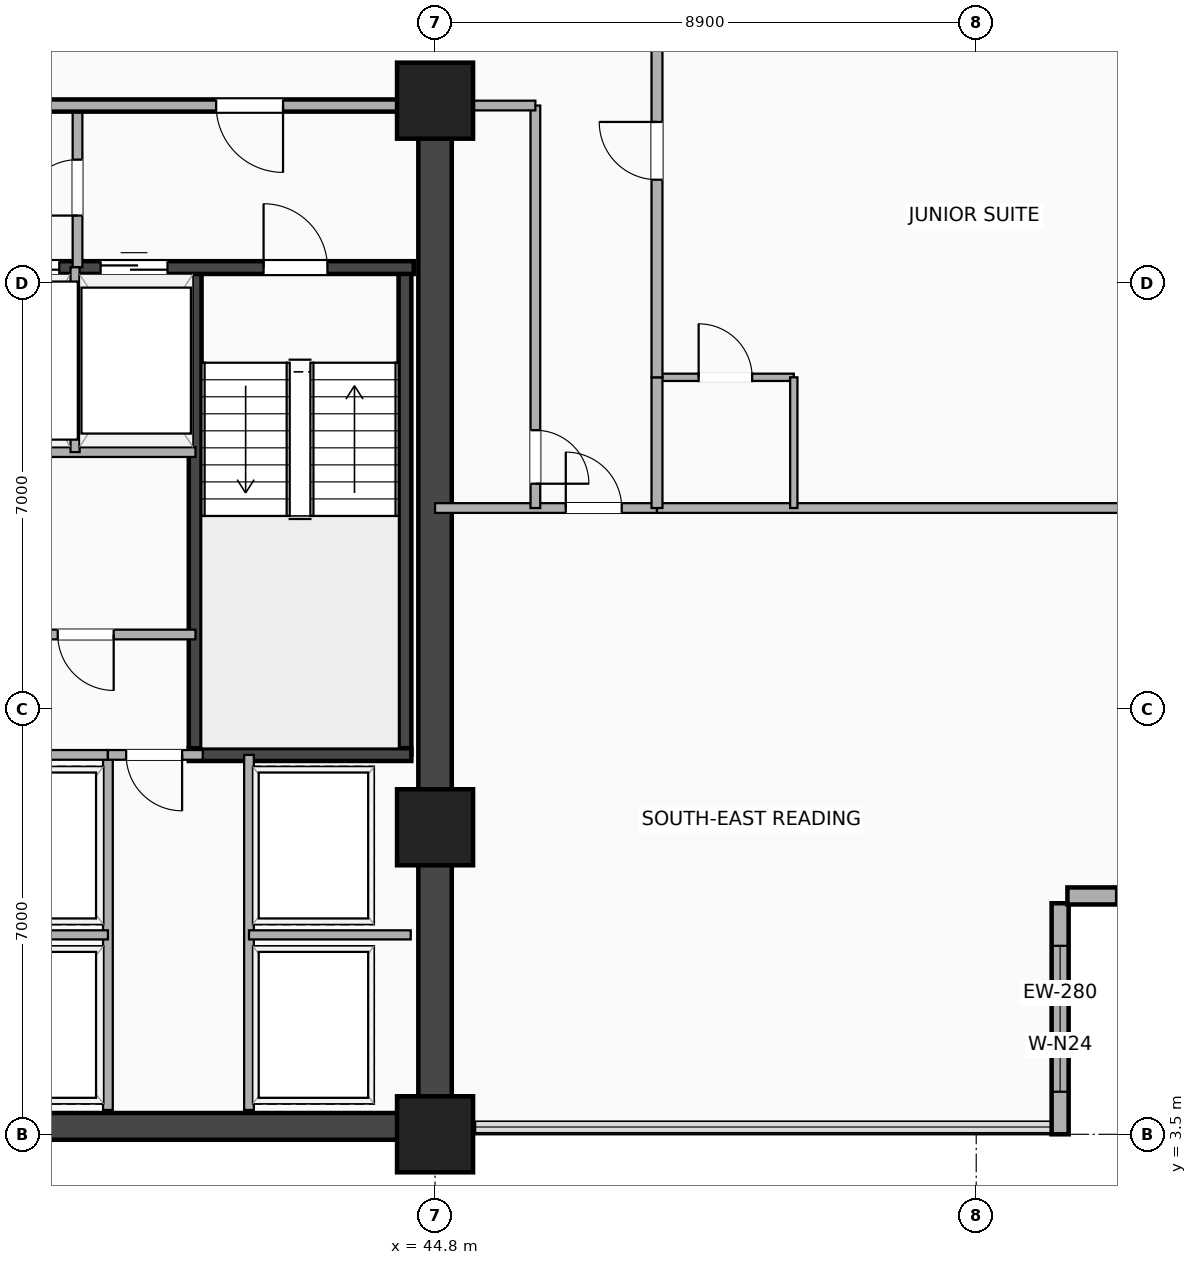
"""IFC4 building model, lengths in metres.
Left out: names, types, materials, properties, quantities, classifications, styles, units other than length and angle.
Written with IfcOpenShell. Run it as: python <this file> out.ifc"""

import sys

from ifc_helpers import new_model, si_unit, direction, frame, frame_2d, origin, origin_2d, place, context, subcontext, project, spatial, rectangle, extrude, element, fill, save


model = new_model("IFC4")
c1 = context("Model", 3, precision=1e-05, world=origin(), true_north=direction((0.0, 1.0)))
c2 = subcontext(c1, "Body", "Model", "MODEL_VIEW")
j1 = project(units=[si_unit("LENGTHUNIT", "METRE"), si_unit("PLANEANGLEUNIT", "RADIAN")], contexts=[c1])
p1 = place(None, origin())
s1 = spatial("IfcSite", under=j1, at=p1, CompositionType="ELEMENT")
p2 = place(p1, origin())
s2 = spatial("IfcBuilding", under=s1, at=p2, CompositionType="ELEMENT")
p3 = place(p2, frame((0.0, 0.0, 95.2)))
s3 = spatial("IfcBuildingStorey", under=s2, at=p3, CompositionType="ELEMENT", Elevation=95.2)
p4 = place(p3, frame((20.3, 3.63, 0.0), z_axis=(0.0, 0.0, 1.0), x_axis=(1.0, 0.0, 0.0)))
e1 = element("IfcWall", 1, at=p4, inside=s3, PredefinedType="SHEAR", context=c2, shape_type="SweptSolid", body=[
    extrude(rectangle(XDim=24.5, YDim=0.44, at=frame_2d((12.25, 0.0))), origin(), (0.0, 0.0, 1.0), 3.24),
])
p5 = place(p3, frame((44.8, 3.5, 0.0), z_axis=(0.0, 0.0, 1.0), x_axis=(0.0, 1.0, 0.0)))
e2 = element("IfcWall", 2, at=p5, inside=s3, PredefinedType="SHEAR", context=c2, shape_type="SweptSolid", body=[
    extrude(rectangle(XDim=16.9, YDim=0.55, at=frame_2d((8.45, 0.0))), origin(), (0.0, 0.0, 1.0), 3.24),
])
for number, where, z_axis, x_axis in (
    (3, (40.855, 9.745, 0.0), (0.0, 0.0, 1.0), (0.0, 1.0, 0.0)),
    (4, (44.305, 9.745, 0.0), (0.0, 0.0, 1.0), (0.0, 1.0, 0.0)),
):
    element("IfcWall", number, at=place(p3, frame(where, z_axis=z_axis, x_axis=x_axis)), inside=s3, PredefinedType="SHEAR", context=c2, shape_type="SweptSolid", body=[
        extrude(rectangle(XDim=8.01, YDim=0.21, at=frame_2d((4.005, 0.0))), origin(), (0.0, 0.0, 1.0), 3.24),
    ])
p6 = place(p3, frame((40.75, 9.745, 0.0), z_axis=(0.0, 0.0, 1.0), x_axis=(1.0, 0.0, 0.0)))
e5 = element("IfcWall", 5, at=p6, inside=s3, PredefinedType="SHEAR", context=c2, shape_type="SweptSolid", body=[
    extrude(rectangle(XDim=3.66, YDim=0.21, at=frame_2d((1.83, 0.0))), origin(), (0.0, 0.0, 1.0), 3.24),
])
p7 = place(p3, frame((37.25, 17.755, 0.0), z_axis=(0.0, 0.0, 1.0), x_axis=(1.0, 0.0, 0.0)))
e6 = element("IfcWall", 6, at=p7, inside=s3, PredefinedType="SHEAR", context=c2, shape_type="SweptSolid", body=[
    extrude(rectangle(XDim=7.2, YDim=0.21, at=frame_2d((3.6, 0.0))), origin(), (0.0, 0.0, 1.0), 3.24),
])
p8 = place(p7, frame((0.25, 0.0, 0.0)))
e7 = element("IfcOpeningElement", 7, at=p8, cuts=e6, PredefinedType="OPENING", context=c2, shape_type="SweptSolid", body=[
    extrude(rectangle(XDim=1.12, YDim=2.2, at=frame_2d((0.56, 1.1))), frame((0.0, 0.115, 0.0), z_axis=(0.0, -1.0, 0.0), x_axis=(1.0, 0.0, 0.0)), (0.0, 0.0, 1.0), 0.23),
])
p9 = place(p7, frame((2.05, 0.0, 0.0)))
e8 = element("IfcOpeningElement", 8, at=p9, cuts=e6, PredefinedType="OPENING", context=c2, shape_type="SweptSolid", body=[
    extrude(rectangle(XDim=1.1, YDim=2.18, at=frame_2d((0.55, 1.09))), frame((0.0, 0.115, 0.0), z_axis=(0.0, -1.0, 0.0), x_axis=(1.0, 0.0, 0.0)), (0.0, 0.0, 1.0), 0.23),
])
p10 = place(p7, frame((5.78, 0.0, 0.0), z_axis=(0.0, 0.0, 1.0), x_axis=(-1.0, 0.0, 0.0)))
e9 = element("IfcOpeningElement", 9, at=p10, cuts=e6, PredefinedType="OPENING", context=c2, shape_type="SweptSolid", body=[
    extrude(rectangle(XDim=1.05, YDim=2.15, at=frame_2d((0.525, 1.075))), frame((0.0, 0.115, 0.0), z_axis=(0.0, -1.0, 0.0), x_axis=(1.0, 0.0, 0.0)), (0.0, 0.0, 1.0), 0.23),
])
for number, where, z_axis, x_axis in (
    (10, (44.8, 3.5, -0.26), (0.0, 0.0, 1.0), (1.0, 0.0, 0.0)),
    (11, (44.8, 8.55, -0.26), (0.0, 0.0, 1.0), (1.0, 0.0, 0.0)),
    (12, (44.8, 20.5, -0.26), (0.0, 0.0, 1.0), (1.0, 0.0, 0.0)),
):
    element("IfcColumn", number, at=place(p3, frame(where, z_axis=z_axis, x_axis=x_axis)), inside=s3, PredefinedType="COLUMN", context=c2, shape_type="SweptSolid", body=[
        extrude(rectangle(XDim=1.25, YDim=1.25, at=origin_2d()), origin(), (0.0, 0.0, 1.0), 3.5),
    ])
p11 = place(p3, frame((55.08, 3.5, 0.0), z_axis=(0.0, 0.0, 1.0), x_axis=(0.0, 1.0, 0.0)))
e13 = element("IfcWall", 13, at=p11, inside=s3, PredefinedType="SOLIDWALL", context=c2, shape_type="SweptSolid", body=[
    extrude(rectangle(XDim=3.8, YDim=0.28, at=frame_2d((1.9, 0.0))), origin(), (0.0, 0.0, 1.0), 3.24),
])
p12 = place(p11, frame((0.7, 0.0, 0.85)))
e14 = element("IfcOpeningElement", 14, at=p12, cuts=e13, PredefinedType="OPENING", context=c2, shape_type="SweptSolid", body=[
    extrude(rectangle(XDim=2.4, YDim=1.65, at=frame_2d((1.2, 0.825))), frame((0.0, 0.15, 0.0), z_axis=(0.0, -1.0, 0.0), x_axis=(1.0, 0.0, 0.0)), (0.0, 0.0, 1.0), 0.3),
])
p13 = place(p3, frame((55.2, 7.42, 0.0), z_axis=(0.0, 0.0, 1.0), x_axis=(1.0, 0.0, 0.0)))
e15 = element("IfcWall", 15, at=p13, inside=s3, PredefinedType="SOLIDWALL", context=c2, shape_type="SweptSolid", body=[
    extrude(rectangle(XDim=3.8, YDim=0.28, at=frame_2d((1.9, 0.0))), origin(), (0.0, 0.0, 1.0), 3.24),
])
p14 = place(p13, frame((0.8, 0.0, 0.85)))
e16 = element("IfcOpeningElement", 16, at=p14, cuts=e15, PredefinedType="OPENING", context=c2, shape_type="SweptSolid", body=[
    extrude(rectangle(XDim=2.2, YDim=1.65, at=frame_2d((1.1, 0.825))), frame((0.0, 0.15, 0.0), z_axis=(0.0, -1.0, 0.0), x_axis=(1.0, 0.0, 0.0)), (0.0, 0.0, 1.0), 0.3),
])
p15 = place(p3, frame((38.92, 17.76, 0.0), z_axis=(0.0, 0.0, 1.0), x_axis=(0.0, 1.0, 0.0)))
e17 = element("IfcWall", 17, at=p15, inside=s3, PredefinedType="PARTITIONING", context=c2, shape_type="SweptSolid", body=[
    extrude(rectangle(XDim=2.66, YDim=0.16, at=frame_2d((1.33, 0.0))), origin(), (0.0, 0.0, 1.0), 2.614),
])
p16 = place(p15, frame((1.77, 0.0, 0.0), z_axis=(0.0, 0.0, 1.0), x_axis=(-1.0, 0.0, 0.0)))
e18 = element("IfcOpeningElement", 18, at=p16, cuts=e17, PredefinedType="OPENING", context=c2, shape_type="SweptSolid", body=[
    extrude(rectangle(XDim=0.92, YDim=2.08, at=frame_2d((0.46, 1.04))), frame((0.0, 0.09, 0.0), z_axis=(0.0, -1.0, 0.0), x_axis=(1.0, 0.0, 0.0)), (0.0, 0.0, 1.0), 0.18),
])
p17 = place(p3, frame((37.25, 14.72, 0.0), z_axis=(0.0, 0.0, 1.0), x_axis=(1.0, 0.0, 0.0)))
e19 = element("IfcWall", 19, at=p17, inside=s3, PredefinedType="PARTITIONING", context=c2, shape_type="SweptSolid", body=[
    extrude(rectangle(XDim=3.61, YDim=0.16, at=frame_2d((1.805, 0.0))), origin(), (0.0, 0.0, 1.0), 3.24),
])
p18 = place(p3, frame((38.88, 14.72, 0.0), z_axis=(0.0, 0.0, 1.0), x_axis=(0.0, 1.0, 0.0)))
e20 = element("IfcWall", 20, at=p18, inside=s3, PredefinedType="PARTITIONING", context=c2, shape_type="SweptSolid", body=[
    extrude(rectangle(XDim=3.04, YDim=0.15, at=frame_2d((1.52, 0.0))), origin(), (0.0, 0.0, 1.0), 3.24),
])
p19 = place(p3, frame((37.0, 20.42, 0.0), z_axis=(0.0, 0.0, 1.0), x_axis=(1.0, 0.0, 0.0)))
e21 = element("IfcWall", 21, at=p19, inside=s3, PredefinedType="PARTITIONING", context=c2, shape_type="SweptSolid", body=[
    extrude(rectangle(XDim=7.45, YDim=0.2, at=frame_2d((3.725, 0.0))), origin(), (0.0, 0.0, 1.0), 2.313),
])
p20 = place(p19, frame((4.2, 0.0, 0.0)))
e22 = element("IfcOpeningElement", 22, at=p20, cuts=e21, PredefinedType="OPENING", context=c2, shape_type="SweptSolid", body=[
    extrude(rectangle(XDim=1.1, YDim=2.15, at=frame_2d((0.55, 1.075))), frame((0.0, 0.11, 0.0), z_axis=(0.0, -1.0, 0.0), x_axis=(1.0, 0.0, 0.0)), (0.0, 0.0, 1.0), 0.22),
])
p21 = place(p3, frame((37.25, 11.72, 0.0), z_axis=(0.0, 0.0, 1.0), x_axis=(1.0, 0.0, 0.0)))
e23 = element("IfcWall", 23, at=p21, inside=s3, PredefinedType="PARTITIONING", context=c2, shape_type="SweptSolid", body=[
    extrude(rectangle(XDim=3.61, YDim=0.16, at=frame_2d((1.805, 0.0))), origin(), (0.0, 0.0, 1.0), 3.24),
])
p22 = place(p21, frame((1.345, 0.0, 0.0)))
e24 = element("IfcOpeningElement", 24, at=p22, cuts=e23, PredefinedType="OPENING", context=c2, shape_type="SweptSolid", body=[
    extrude(rectangle(XDim=0.92, YDim=2.08, at=frame_2d((0.46, 1.04))), frame((0.0, 0.09, 0.0), z_axis=(0.0, -1.0, 0.0), x_axis=(1.0, 0.0, 0.0)), (0.0, 0.0, 1.0), 0.18),
])
for number, where, z_axis, x_axis in (
    (25, (39.42, 3.9, 0.0), (0.0, 0.0, 1.0), (0.0, 1.0, 0.0)),
    (26, (41.74, 3.9, 0.0), (0.0, 0.0, 1.0), (0.0, 1.0, 0.0)),
):
    element("IfcWall", number, at=place(p3, frame(where, z_axis=z_axis, x_axis=x_axis)), inside=s3, PredefinedType="PARTITIONING", context=c2, shape_type="SweptSolid", body=[
        extrude(rectangle(XDim=5.84, YDim=0.16, at=frame_2d((2.92, 0.0))), origin(), (0.0, 0.0, 1.0), 3.24),
    ])
p23 = place(p3, frame((37.25, 6.78, 0.0), z_axis=(0.0, 0.0, 1.0), x_axis=(1.0, 0.0, 0.0)))
e27 = element("IfcWall", 27, at=p23, inside=s3, PredefinedType="PARTITIONING", context=c2, shape_type="SweptSolid", body=[
    extrude(rectangle(XDim=2.17, YDim=0.15, at=frame_2d((1.085, 0.0))), origin(), (0.0, 0.0, 1.0), 3.24),
])
p24 = place(p3, frame((41.74, 6.78, 0.0), z_axis=(0.0, 0.0, 1.0), x_axis=(1.0, 0.0, 0.0)))
e28 = element("IfcWall", 28, at=p24, inside=s3, PredefinedType="PARTITIONING", context=c2, shape_type="SweptSolid", body=[
    extrude(rectangle(XDim=2.66, YDim=0.15, at=frame_2d((1.33, 0.0))), origin(), (0.0, 0.0, 1.0), 2.313),
])
p25 = place(p3, frame((37.25, 9.74, 0.0), z_axis=(0.0, 0.0, 1.0), x_axis=(1.0, 0.0, 0.0)))
e29 = element("IfcWall", 29, at=p25, inside=s3, PredefinedType="PARTITIONING", context=c2, shape_type="SweptSolid", body=[
    extrude(rectangle(XDim=2.17, YDim=0.16, at=frame_2d((1.085, 0.0))), origin(), (0.0, 0.0, 1.0), 3.24),
])
p26 = place(p3, frame((39.42, 9.74, 0.0), z_axis=(0.0, 0.0, 1.0), x_axis=(1.0, 0.0, 0.0)))
e30 = element("IfcWall", 30, at=p26, inside=s3, PredefinedType="PARTITIONING", context=c2, shape_type="SweptSolid", body=[
    extrude(rectangle(XDim=1.56, YDim=0.16, at=frame_2d((0.78, 0.0))), origin(), (0.0, 0.0, 1.0), 3.24),
])
p27 = place(p26, frame((0.3, 0.0, 0.0)))
e31 = element("IfcOpeningElement", 31, at=p27, cuts=e30, PredefinedType="OPENING", context=c2, shape_type="SweptSolid", body=[
    extrude(rectangle(XDim=0.92, YDim=2.08, at=frame_2d((0.46, 1.04))), frame((0.0, 0.09, 0.0), z_axis=(0.0, -1.0, 0.0), x_axis=(1.0, 0.0, 0.0)), (0.0, 0.0, 1.0), 0.18),
])
p28 = place(p3, frame((44.8, 13.8, 0.0), z_axis=(0.0, 0.0, 1.0), x_axis=(1.0, 0.0, 0.0)))
e32 = element("IfcWall", 32, at=p28, inside=s3, PredefinedType="PARTITIONING", context=c2, shape_type="SweptSolid", body=[
    extrude(rectangle(XDim=3.65, YDim=0.16, at=frame_2d((1.825, 0.0))), origin(), (0.0, 0.0, 1.0), 2.313),
])
p29 = place(p28, frame((3.07, 0.0, 0.0), z_axis=(0.0, 0.0, 1.0), x_axis=(-1.0, 0.0, 0.0)))
e33 = element("IfcOpeningElement", 33, at=p29, cuts=e32, PredefinedType="OPENING", context=c2, shape_type="SweptSolid", body=[
    extrude(rectangle(XDim=0.92, YDim=2.08, at=frame_2d((0.46, 1.04))), frame((0.0, 0.09, 0.0), z_axis=(0.0, -1.0, 0.0), x_axis=(1.0, 0.0, 0.0)), (0.0, 0.0, 1.0), 0.18),
])
p30 = place(p3, frame((46.45, 13.8, 0.0), z_axis=(0.0, 0.0, 1.0), x_axis=(0.0, 1.0, 0.0)))
e34 = element("IfcWall", 34, at=p30, inside=s3, PredefinedType="PARTITIONING", context=c2, shape_type="SweptSolid", body=[
    extrude(rectangle(XDim=6.62, YDim=0.16, at=frame_2d((3.31, 0.0))), origin(), (0.0, 0.0, 1.0), 2.313),
])
p31 = place(p30, frame((0.4, 0.0, 0.0)))
e35 = element("IfcOpeningElement", 35, at=p31, cuts=e34, PredefinedType="OPENING", context=c2, shape_type="SweptSolid", body=[
    extrude(rectangle(XDim=0.88, YDim=2.08, at=frame_2d((0.44, 1.04))), frame((0.0, 0.09, 0.0), z_axis=(0.0, -1.0, 0.0), x_axis=(1.0, 0.0, 0.0)), (0.0, 0.0, 1.0), 0.18),
])
p32 = place(p3, frame((44.8, 20.42, 0.0), z_axis=(0.0, 0.0, 1.0), x_axis=(1.0, 0.0, 0.0)))
e36 = element("IfcWall", 36, at=p32, inside=s3, PredefinedType="PARTITIONING", context=c2, shape_type="SweptSolid", body=[
    extrude(rectangle(XDim=1.65, YDim=0.16, at=frame_2d((0.825, 0.0))), origin(), (0.0, 0.0, 1.0), 2.313),
])
p33 = place(p3, frame((48.45, 13.8, 0.0), z_axis=(0.0, 0.0, 1.0), x_axis=(1.0, 0.0, 0.0)))
e37 = element("IfcWall", 37, at=p33, inside=s3, PredefinedType="PARTITIONING", context=c2, shape_type="SweptSolid", body=[
    extrude(rectangle(XDim=10.43, YDim=0.16, at=frame_2d((5.215, 0.0))), origin(), (0.0, 0.0, 1.0), 2.603),
])
p34 = place(p3, frame((48.45, 15.95, 0.0), z_axis=(0.0, 0.0, 1.0), x_axis=(1.0, 0.0, 0.0)))
e38 = element("IfcWall", 38, at=p34, inside=s3, PredefinedType="PARTITIONING", context=c2, shape_type="SweptSolid", body=[
    extrude(rectangle(XDim=2.25, YDim=0.12, at=frame_2d((1.125, 0.0))), origin(), (0.0, 0.0, 1.0), 3.24),
])
p35 = place(p34, frame((1.565, 0.0, 0.0), z_axis=(0.0, 0.0, 1.0), x_axis=(-1.0, 0.0, 0.0)))
e39 = element("IfcOpeningElement", 39, at=p35, cuts=e38, PredefinedType="OPENING", context=c2, shape_type="SweptSolid", body=[
    extrude(rectangle(XDim=0.88, YDim=2.08, at=frame_2d((0.44, 1.04))), frame((0.0, 0.07, 0.0), z_axis=(0.0, -1.0, 0.0), x_axis=(1.0, 0.0, 0.0)), (0.0, 0.0, 1.0), 0.14),
])
p36 = place(p3, frame((50.7, 13.8, 0.0), z_axis=(0.0, 0.0, 1.0), x_axis=(0.0, 1.0, 0.0)))
e40 = element("IfcWall", 40, at=p36, inside=s3, PredefinedType="PARTITIONING", context=c2, shape_type="SweptSolid", body=[
    extrude(rectangle(XDim=2.15, YDim=0.12, at=frame_2d((1.075, 0.0))), origin(), (0.0, 0.0, 1.0), 2.922),
])
p37 = place(p3, frame((48.45, 13.8, 0.0), z_axis=(0.0, 0.0, 1.0), x_axis=(0.0, 1.0, 0.0)))
e41 = element("IfcWall", 41, at=p37, inside=s3, PredefinedType="PARTITIONING", context=c2, shape_type="SweptSolid", body=[
    extrude(rectangle(XDim=2.15, YDim=0.18, at=frame_2d((1.075, 0.0))), origin(), (0.0, 0.0, 1.0), 2.922),
])
p38 = place(p3, frame((48.45, 15.95, 0.0), z_axis=(0.0, 0.0, 1.0), x_axis=(0.0, 1.0, 0.0)))
e42 = element("IfcWall", 42, at=p38, inside=s3, PredefinedType="PARTITIONING", context=c2, shape_type="SweptSolid", body=[
    extrude(rectangle(XDim=7.45, YDim=0.18, at=frame_2d((3.725, 0.0))), origin(), (0.0, 0.0, 1.0), 2.313),
])
p39 = place(p38, frame((4.2, 0.0, 0.0), z_axis=(0.0, 0.0, 1.0), x_axis=(-1.0, 0.0, 0.0)))
e43 = element("IfcOpeningElement", 43, at=p39, cuts=e42, PredefinedType="OPENING", context=c2, shape_type="SweptSolid", body=[
    extrude(rectangle(XDim=0.95, YDim=2.15, at=frame_2d((0.475, 1.075))), frame((0.0, 0.1, 0.0), z_axis=(0.0, -1.0, 0.0), x_axis=(1.0, 0.0, 0.0)), (0.0, 0.0, 1.0), 0.2),
])
p40 = place(p12, origin())
e44 = element("IfcWindow", 44, at=p40, inside=s3, PartitioningType="SINGLE_PANEL", PredefinedType="WINDOW", context=c2, shape_type="SweptSolid", body=[
    extrude(rectangle(XDim=2.4, YDim=1.65, at=frame_2d((1.2, 0.825))), frame((0.0, 0.03, 0.0), z_axis=(0.0, -1.0, 0.0), x_axis=(1.0, 0.0, 0.0)), (0.0, 0.0, 1.0), 0.06),
])
fill(e14, e44)
p41 = place(p14, origin())
e45 = element("IfcWindow", 45, at=p41, inside=s3, PartitioningType="SINGLE_PANEL", PredefinedType="WINDOW", context=c2, shape_type="SweptSolid", body=[
    extrude(rectangle(XDim=2.2, YDim=1.65, at=frame_2d((1.1, 0.825))), frame((0.0, 0.03, 0.0), z_axis=(0.0, -1.0, 0.0), x_axis=(1.0, 0.0, 0.0)), (0.0, 0.0, 1.0), 0.06),
])
fill(e16, e45)
p42 = place(p8, origin())
e46 = element("IfcDoor", 46, at=p42, inside=s3, OperationType="DOUBLE_DOOR_SLIDING", PredefinedType="DOOR", context=c2, shape_type="SweptSolid", body=[
    extrude(rectangle(XDim=1.12, YDim=2.2, at=frame_2d((0.56, 1.1))), frame((0.0, 0.025, 0.0), z_axis=(0.0, -1.0, 0.0), x_axis=(1.0, 0.0, 0.0)), (0.0, 0.0, 1.0), 0.05),
])
fill(e7, e46)
p43 = place(p9, origin())
e47 = element("IfcDoor", 47, at=p43, inside=s3, OperationType="DOUBLE_DOOR_SLIDING", PredefinedType="DOOR", context=c2, shape_type="SweptSolid", body=[
    extrude(rectangle(XDim=1.1, YDim=2.18, at=frame_2d((0.55, 1.09))), frame((0.0, 0.025, 0.0), z_axis=(0.0, -1.0, 0.0), x_axis=(1.0, 0.0, 0.0)), (0.0, 0.0, 1.0), 0.05),
])
fill(e8, e47)
p44 = place(p10, origin())
e48 = element("IfcDoor", 48, at=p44, inside=s3, OperationType="SINGLE_SWING_LEFT", PredefinedType="DOOR", context=c2, shape_type="SweptSolid", body=[
    extrude(rectangle(XDim=1.05, YDim=2.15, at=frame_2d((0.525, 1.075))), frame((0.0, 0.025, 0.0), z_axis=(0.0, -1.0, 0.0), x_axis=(1.0, 0.0, 0.0)), (0.0, 0.0, 1.0), 0.05),
])
fill(e9, e48)
p45 = place(p16, origin())
e49 = element("IfcDoor", 49, at=p45, inside=s3, OperationType="SINGLE_SWING_LEFT", PredefinedType="DOOR", context=c2, shape_type="SweptSolid", body=[
    extrude(rectangle(XDim=0.92, YDim=2.08, at=frame_2d((0.46, 1.04))), frame((0.0, 0.025, 0.0), z_axis=(0.0, -1.0, 0.0), x_axis=(1.0, 0.0, 0.0)), (0.0, 0.0, 1.0), 0.05),
])
fill(e18, e49)
p46 = place(p20, origin())
e50 = element("IfcDoor", 50, at=p46, inside=s3, OperationType="SINGLE_SWING_RIGHT", PredefinedType="DOOR", context=c2, shape_type="SweptSolid", body=[
    extrude(rectangle(XDim=1.1, YDim=2.15, at=frame_2d((0.55, 1.075))), frame((0.0, 0.025, 0.0), z_axis=(0.0, -1.0, 0.0), x_axis=(1.0, 0.0, 0.0)), (0.0, 0.0, 1.0), 0.05),
])
fill(e22, e50)
p47 = place(p22, origin())
e51 = element("IfcDoor", 51, at=p47, inside=s3, OperationType="SINGLE_SWING_RIGHT", PredefinedType="DOOR", context=c2, shape_type="SweptSolid", body=[
    extrude(rectangle(XDim=0.92, YDim=2.08, at=frame_2d((0.46, 1.04))), frame((0.0, 0.025, 0.0), z_axis=(0.0, -1.0, 0.0), x_axis=(1.0, 0.0, 0.0)), (0.0, 0.0, 1.0), 0.05),
])
fill(e24, e51)
p48 = place(p27, origin())
e52 = element("IfcDoor", 52, at=p48, inside=s3, OperationType="SINGLE_SWING_RIGHT", PredefinedType="DOOR", context=c2, shape_type="SweptSolid", body=[
    extrude(rectangle(XDim=0.92, YDim=2.08, at=frame_2d((0.46, 1.04))), frame((0.0, 0.025, 0.0), z_axis=(0.0, -1.0, 0.0), x_axis=(1.0, 0.0, 0.0)), (0.0, 0.0, 1.0), 0.05),
])
fill(e31, e52)
p49 = place(p29, origin())
e53 = element("IfcDoor", 53, at=p49, inside=s3, OperationType="SINGLE_SWING_LEFT", PredefinedType="DOOR", context=c2, shape_type="SweptSolid", body=[
    extrude(rectangle(XDim=0.92, YDim=2.08, at=frame_2d((0.46, 1.04))), frame((0.0, 0.025, 0.0), z_axis=(0.0, -1.0, 0.0), x_axis=(1.0, 0.0, 0.0)), (0.0, 0.0, 1.0), 0.05),
])
fill(e33, e53)
p50 = place(p31, origin())
e54 = element("IfcDoor", 54, at=p50, inside=s3, OperationType="SINGLE_SWING_LEFT", PredefinedType="DOOR", context=c2, shape_type="SweptSolid", body=[
    extrude(rectangle(XDim=0.88, YDim=2.08, at=frame_2d((0.44, 1.04))), frame((0.0, 0.025, 0.0), z_axis=(0.0, -1.0, 0.0), x_axis=(1.0, 0.0, 0.0)), (0.0, 0.0, 1.0), 0.05),
])
fill(e35, e54)
p51 = place(p35, origin())
e55 = element("IfcDoor", 55, at=p51, inside=s3, OperationType="SINGLE_SWING_LEFT", PredefinedType="DOOR", context=c2, shape_type="SweptSolid", body=[
    extrude(rectangle(XDim=0.88, YDim=2.08, at=frame_2d((0.44, 1.04))), frame((0.0, 0.025, 0.0), z_axis=(0.0, -1.0, 0.0), x_axis=(1.0, 0.0, 0.0)), (0.0, 0.0, 1.0), 0.05),
])
fill(e39, e55)
p52 = place(p39, origin())
e56 = element("IfcDoor", 56, at=p52, inside=s3, OperationType="SINGLE_SWING_RIGHT", PredefinedType="DOOR", context=c2, shape_type="SweptSolid", body=[
    extrude(rectangle(XDim=0.95, YDim=2.15, at=frame_2d((0.475, 1.075))), frame((0.0, 0.025, 0.0), z_axis=(0.0, -1.0, 0.0), x_axis=(1.0, 0.0, 0.0)), (0.0, 0.0, 1.0), 0.05),
])
fill(e43, e56)
save(model, sys.argv[1])
